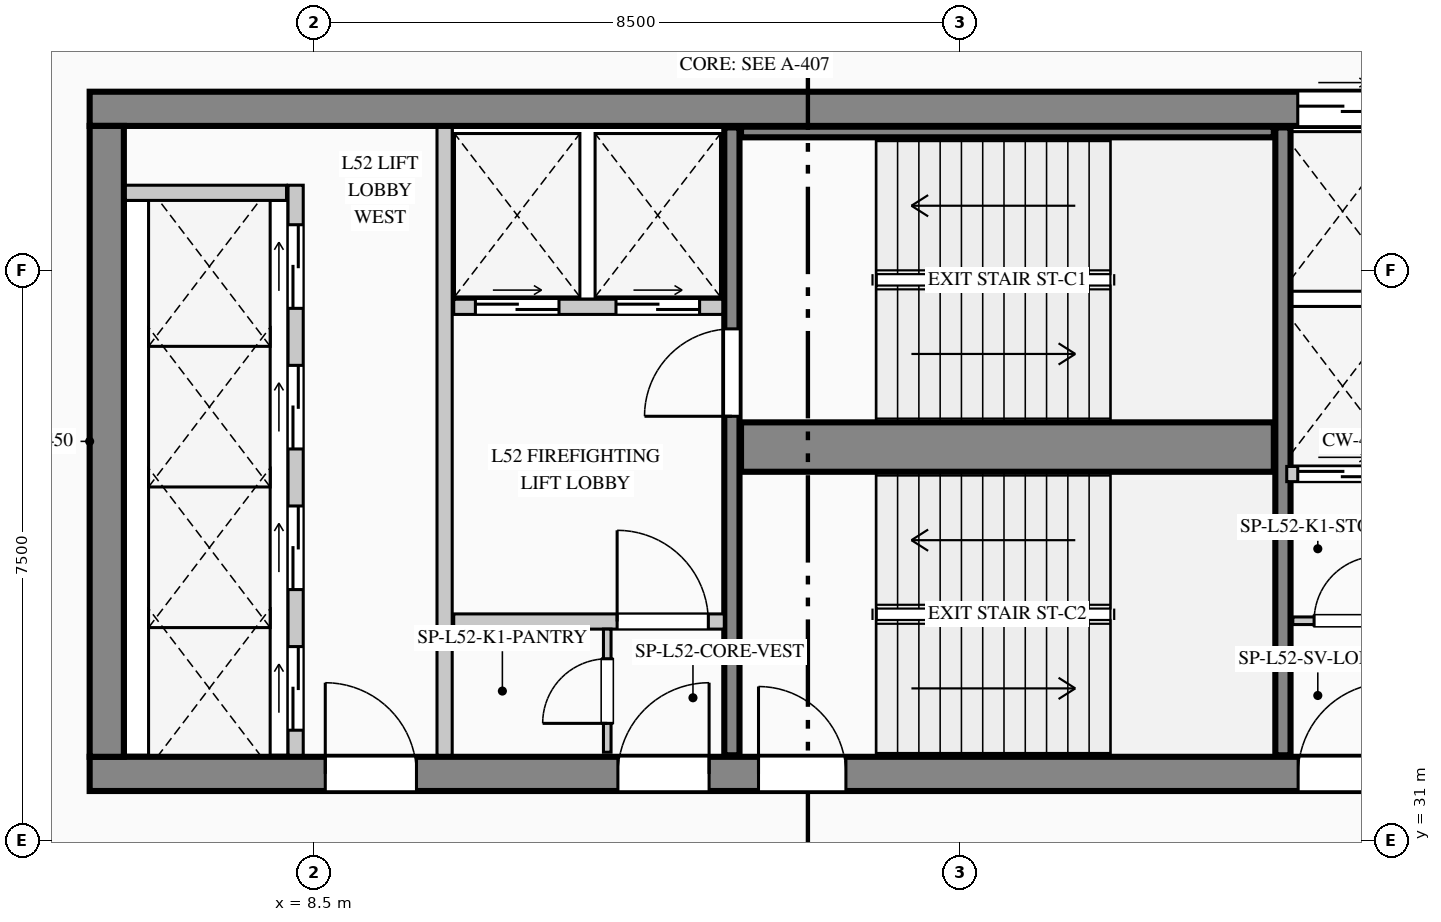
"""IFC4 building model, lengths in metres.
Left out: names, types, materials, properties, quantities, classifications, styles, units other than length and angle.
Written with IfcOpenShell. Run it as: python <this file> out.ifc"""

import sys

from ifc_helpers import new_model, si_unit, direction, frame, frame_2d, origin, place, context, subcontext, project, spatial, rectangle, extrude, element, fill, save


model = new_model("IFC4")
c1 = context("Model", 3, precision=1e-05, world=origin(), true_north=direction((0.0, 1.0)))
c2 = subcontext(c1, "Body", "Model", "MODEL_VIEW")
j1 = project(units=[si_unit("LENGTHUNIT", "METRE"), si_unit("PLANEANGLEUNIT", "RADIAN")], contexts=[c1])
p1 = place(None, origin())
s1 = spatial("IfcSite", under=j1, at=p1, CompositionType="ELEMENT")
p2 = place(p1, origin())
s2 = spatial("IfcBuilding", under=s1, at=p2, CompositionType="ELEMENT")
p3 = place(p2, frame((0.0, 0.0, 219.3)))
s3 = spatial("IfcBuildingStorey", under=s2, at=p3, CompositionType="ELEMENT", Elevation=219.3)
p4 = place(p3, frame((5.55, 40.625, 0.0), z_axis=(0.0, 0.0, 1.0), x_axis=(1.0, 0.0, 0.0)))
e1 = element("IfcWall", 1, at=p4, inside=s3, PredefinedType="SHEAR", context=c2, shape_type="SweptSolid", body=[
    extrude(rectangle(XDim=17.75, YDim=0.45, at=frame_2d((8.875, 0.0))), origin(), (0.0, 0.0, 1.0), 3.95),
])
p5 = place(p4, frame((15.895, 0.0, 0.0)))
e2 = element("IfcOpeningElement", 2, at=p5, cuts=e1, PredefinedType="OPENING", context=c2, shape_type="SweptSolid", body=[
    extrude(rectangle(XDim=1.18, YDim=2.25, at=frame_2d((0.59, 1.125))), frame((0.0, 0.235, 0.0), z_axis=(0.0, -1.0, 0.0), x_axis=(1.0, 0.0, 0.0)), (0.0, 0.0, 1.0), 0.47),
])
p6 = place(p3, frame((5.55, 31.875, 0.0), z_axis=(0.0, 0.0, 1.0), x_axis=(1.0, 0.0, 0.0)))
e3 = element("IfcWall", 3, at=p6, inside=s3, PredefinedType="SHEAR", context=c2, shape_type="SweptSolid", body=[
    extrude(rectangle(XDim=17.75, YDim=0.45, at=frame_2d((8.875, 0.0))), origin(), (0.0, 0.0, 1.0), 3.95),
])
p7 = place(p6, frame((3.1, 0.0, 0.0)))
e4 = element("IfcOpeningElement", 4, at=p7, cuts=e3, PredefinedType="OPENING", context=c2, shape_type="SweptSolid", body=[
    extrude(rectangle(XDim=1.2, YDim=2.2, at=frame_2d((0.6, 1.1))), frame((0.0, 0.235, 0.0), z_axis=(0.0, -1.0, 0.0), x_axis=(1.0, 0.0, 0.0)), (0.0, 0.0, 1.0), 0.47),
])
p8 = place(p6, frame((6.95, 0.0, 0.0)))
e5 = element("IfcOpeningElement", 5, at=p8, cuts=e3, PredefinedType="OPENING", context=c2, shape_type="SweptSolid", body=[
    extrude(rectangle(XDim=1.2, YDim=2.2, at=frame_2d((0.6, 1.1))), frame((0.0, 0.235, 0.0), z_axis=(0.0, -1.0, 0.0), x_axis=(1.0, 0.0, 0.0)), (0.0, 0.0, 1.0), 0.47),
])
p9 = place(p6, frame((8.8, 0.0, 0.0)))
e6 = element("IfcOpeningElement", 6, at=p9, cuts=e3, PredefinedType="OPENING", context=c2, shape_type="SweptSolid", body=[
    extrude(rectangle(XDim=1.15, YDim=2.2, at=frame_2d((0.575, 1.1))), frame((0.0, 0.235, 0.0), z_axis=(0.0, -1.0, 0.0), x_axis=(1.0, 0.0, 0.0)), (0.0, 0.0, 1.0), 0.47),
])
p10 = place(p6, frame((15.9, 0.0, 0.0)))
e7 = element("IfcOpeningElement", 7, at=p10, cuts=e3, PredefinedType="OPENING", context=c2, shape_type="SweptSolid", body=[
    extrude(rectangle(XDim=1.2, YDim=2.2, at=frame_2d((0.6, 1.1))), frame((0.0, 0.235, 0.0), z_axis=(0.0, -1.0, 0.0), x_axis=(1.0, 0.0, 0.0)), (0.0, 0.0, 1.0), 0.47),
])
p11 = place(p3, frame((5.775, 32.1, 0.0), z_axis=(0.0, 0.0, 1.0), x_axis=(0.0, 1.0, 0.0)))
e8 = element("IfcWall", 8, at=p11, inside=s3, PredefinedType="SHEAR", context=c2, shape_type="SweptSolid", body=[
    extrude(rectangle(XDim=8.3, YDim=0.45, at=frame_2d((4.15, 0.0))), origin(), (0.0, 0.0, 1.0), 3.95),
])
p12 = place(p3, frame((14.0, 32.12, 0.0), z_axis=(0.0, 0.0, 1.0), x_axis=(0.0, 1.0, 0.0)))
e9 = element("IfcWall", 9, at=p12, inside=s3, PredefinedType="SHEAR", context=c2, shape_type="SweptSolid", body=[
    extrude(rectangle(XDim=8.26, YDim=0.2, at=frame_2d((4.13, 0.0))), origin(), (0.0, 0.0, 1.0), 3.95),
])
p13 = place(p12, frame((4.46, 0.0, 0.0)))
e10 = element("IfcOpeningElement", 10, at=p13, cuts=e9, PredefinedType="OPENING", context=c2, shape_type="SweptSolid", body=[
    extrude(rectangle(XDim=1.15, YDim=2.2, at=frame_2d((0.575, 1.1))), frame((0.0, 0.11, 0.0), z_axis=(0.0, -1.0, 0.0), x_axis=(1.0, 0.0, 0.0)), (0.0, 0.0, 1.0), 0.22),
])
p14 = place(p3, frame((14.12, 36.175, 0.0), z_axis=(0.0, 0.0, 1.0), x_axis=(1.0, 0.0, 0.0)))
e11 = element("IfcWall", 11, at=p14, inside=s3, PredefinedType="SHEAR", context=c2, shape_type="SweptSolid", body=[
    extrude(rectangle(XDim=7.01, YDim=0.65, at=frame_2d((3.505, 0.0))), origin(), (0.0, 0.0, 1.0), 3.95),
])
p15 = place(p3, frame((21.25, 32.12, 0.0), z_axis=(0.0, 0.0, 1.0), x_axis=(0.0, 1.0, 0.0)))
e12 = element("IfcWall", 12, at=p15, inside=s3, PredefinedType="SHEAR", context=c2, shape_type="SweptSolid", body=[
    extrude(rectangle(XDim=8.26, YDim=0.2, at=frame_2d((4.13, 0.0))), origin(), (0.0, 0.0, 1.0), 3.95),
])
p16 = place(p3, frame((14.12, 40.32, 0.0), z_axis=(0.0, 0.0, 1.0), x_axis=(1.0, 0.0, 0.0)))
e13 = element("IfcWall", 13, at=p16, inside=s3, PredefinedType="SHEAR", context=c2, shape_type="SweptSolid", body=[
    extrude(rectangle(XDim=7.01, YDim=0.14, at=frame_2d((3.505, 0.0))), origin(), (0.0, 0.0, 1.0), 3.95),
])
p17 = place(p3, frame((7.46, 4.62, 0.0), z_axis=(0.0, 0.0, 1.0), x_axis=(-0.123515576323, 0.992342633573, 0.0)))
e14 = element("IfcWall", 14, at=p17, inside=s3, PredefinedType="STANDARD", context=c2, shape_type="SweptSolid", body=[
    extrude(rectangle(XDim=37.043, YDim=0.24, at=frame_2d((18.522, 0.0))), origin(), (0.0, 0.0, 1.0), 3.7),
])
p18 = place(p17, frame((9.536, 0.0, 0.9)))
e15 = element("IfcOpeningElement", 15, at=p18, cuts=e14, PredefinedType="OPENING", context=c2, shape_type="SweptSolid", body=[
    extrude(rectangle(XDim=2.7, YDim=2.1, at=frame_2d((1.35, 1.05))), frame((0.0, 0.13, 0.0), z_axis=(0.0, -1.0, 0.0), x_axis=(1.0, 0.0, 0.0)), (0.0, 0.0, 1.0), 0.26),
])
p19 = place(p3, frame((8.26, 32.12, 0.0), z_axis=(0.0, 0.0, 1.0), x_axis=(0.0, 1.0, 0.0)))
e16 = element("IfcWall", 16, at=p19, inside=s3, PredefinedType="PARTITIONING", context=c2, shape_type="SweptSolid", body=[
    extrude(rectangle(XDim=7.5, YDim=0.2, at=frame_2d((3.75, 0.0))), origin(), (0.0, 0.0, 1.0), 3.7),
])
p20 = place(p19, frame((0.33, 0.0, 0.0)))
e17 = element("IfcOpeningElement", 17, at=p20, cuts=e16, PredefinedType="OPENING", context=c2, shape_type="SweptSolid", body=[
    extrude(rectangle(XDim=1.1, YDim=2.2, at=frame_2d((0.55, 1.1))), frame((0.0, 0.11, 0.0), z_axis=(0.0, -1.0, 0.0), x_axis=(1.0, 0.0, 0.0)), (0.0, 0.0, 1.0), 0.22),
])
p21 = place(p19, frame((2.18, 0.0, 0.0)))
e18 = element("IfcOpeningElement", 18, at=p21, cuts=e16, PredefinedType="OPENING", context=c2, shape_type="SweptSolid", body=[
    extrude(rectangle(XDim=1.1, YDim=2.2, at=frame_2d((0.55, 1.1))), frame((0.0, 0.11, 0.0), z_axis=(0.0, -1.0, 0.0), x_axis=(1.0, 0.0, 0.0)), (0.0, 0.0, 1.0), 0.22),
])
p22 = place(p19, frame((4.03, 0.0, 0.0)))
e19 = element("IfcOpeningElement", 19, at=p22, cuts=e16, PredefinedType="OPENING", context=c2, shape_type="SweptSolid", body=[
    extrude(rectangle(XDim=1.1, YDim=2.2, at=frame_2d((0.55, 1.1))), frame((0.0, 0.11, 0.0), z_axis=(0.0, -1.0, 0.0), x_axis=(1.0, 0.0, 0.0)), (0.0, 0.0, 1.0), 0.22),
])
p23 = place(p19, frame((5.88, 0.0, 0.0)))
e20 = element("IfcOpeningElement", 20, at=p23, cuts=e16, PredefinedType="OPENING", context=c2, shape_type="SweptSolid", body=[
    extrude(rectangle(XDim=1.1, YDim=2.2, at=frame_2d((0.55, 1.1))), frame((0.0, 0.11, 0.0), z_axis=(0.0, -1.0, 0.0), x_axis=(1.0, 0.0, 0.0)), (0.0, 0.0, 1.0), 0.22),
])
p24 = place(p3, frame((6.02, 39.52, 0.0), z_axis=(0.0, 0.0, 1.0), x_axis=(1.0, 0.0, 0.0)))
e21 = element("IfcWall", 21, at=p24, inside=s3, PredefinedType="PARTITIONING", context=c2, shape_type="SweptSolid", body=[
    extrude(rectangle(XDim=2.12, YDim=0.2, at=frame_2d((1.06, 0.0))), origin(), (0.0, 0.0, 1.0), 3.7),
])
p25 = place(p3, frame((10.22, 32.12, 0.0), z_axis=(0.0, 0.0, 1.0), x_axis=(0.0, 1.0, 0.0)))
e22 = element("IfcWall", 22, at=p25, inside=s3, PredefinedType="PARTITIONING", context=c2, shape_type="SweptSolid", body=[
    extrude(rectangle(XDim=8.26, YDim=0.2, at=frame_2d((4.13, 0.0))), origin(), (0.0, 0.0, 1.0), 3.7),
])
p26 = place(p3, frame((10.34, 38.02, 0.0), z_axis=(0.0, 0.0, 1.0), x_axis=(1.0, 0.0, 0.0)))
e23 = element("IfcWall", 23, at=p26, inside=s3, PredefinedType="PARTITIONING", context=c2, shape_type="SweptSolid", body=[
    extrude(rectangle(XDim=3.54, YDim=0.2, at=frame_2d((1.77, 0.0))), origin(), (0.0, 0.0, 1.0), 3.7),
])
p27 = place(p26, frame((0.285, 0.0, 0.0)))
e24 = element("IfcOpeningElement", 24, at=p27, cuts=e23, PredefinedType="OPENING", context=c2, shape_type="SweptSolid", body=[
    extrude(rectangle(XDim=1.1, YDim=2.2, at=frame_2d((0.55, 1.1))), frame((0.0, 0.11, 0.0), z_axis=(0.0, -1.0, 0.0), x_axis=(1.0, 0.0, 0.0)), (0.0, 0.0, 1.0), 0.22),
])
p28 = place(p26, frame((2.135, 0.0, 0.0)))
e25 = element("IfcOpeningElement", 25, at=p28, cuts=e23, PredefinedType="OPENING", context=c2, shape_type="SweptSolid", body=[
    extrude(rectangle(XDim=1.1, YDim=2.2, at=frame_2d((0.55, 1.1))), frame((0.0, 0.11, 0.0), z_axis=(0.0, -1.0, 0.0), x_axis=(1.0, 0.0, 0.0)), (0.0, 0.0, 1.0), 0.22),
])
p29 = place(p3, frame((10.34, 33.88, 0.0), z_axis=(0.0, 0.0, 1.0), x_axis=(1.0, 0.0, 0.0)))
e26 = element("IfcWall", 26, at=p29, inside=s3, PredefinedType="PARTITIONING", context=c2, shape_type="SweptSolid", body=[
    extrude(rectangle(XDim=3.56, YDim=0.2, at=frame_2d((1.78, 0.0))), origin(), (0.0, 0.0, 1.0), 3.7),
])
p30 = place(p29, frame((2.15, 0.0, 0.0)))
e27 = element("IfcOpeningElement", 27, at=p30, cuts=e26, PredefinedType="OPENING", context=c2, shape_type="SweptSolid", body=[
    extrude(rectangle(XDim=1.2, YDim=2.2, at=frame_2d((0.6, 1.1))), frame((0.0, 0.11, 0.0), z_axis=(0.0, -1.0, 0.0), x_axis=(1.0, 0.0, 0.0)), (0.0, 0.0, 1.0), 0.22),
])
p31 = place(p3, frame((12.36, 32.16, 0.0), z_axis=(0.0, 0.0, 1.0), x_axis=(0.0, 1.0, 0.0)))
e28 = element("IfcWall", 28, at=p31, inside=s3, PredefinedType="PARTITIONING", context=c2, shape_type="SweptSolid", body=[
    extrude(rectangle(XDim=1.62, YDim=0.1, at=frame_2d((0.81, 0.0))), origin(), (0.0, 0.0, 1.0), 3.7),
])
p32 = place(p31, frame((0.38, 0.0, 0.0)))
e29 = element("IfcOpeningElement", 29, at=p32, cuts=e28, PredefinedType="OPENING", context=c2, shape_type="SweptSolid", body=[
    extrude(rectangle(XDim=0.85, YDim=2.1, at=frame_2d((0.425, 1.05))), frame((0.0, 0.06, 0.0), z_axis=(0.0, -1.0, 0.0), x_axis=(1.0, 0.0, 0.0)), (0.0, 0.0, 1.0), 0.12),
])
p33 = place(p3, frame((21.38, 33.89, 0.0), z_axis=(0.0, 0.0, 1.0), x_axis=(1.0, 0.0, 0.0)))
e30 = element("IfcWall", 30, at=p33, inside=s3, PredefinedType="PARTITIONING", context=c2, shape_type="SweptSolid", body=[
    extrude(rectangle(XDim=1.42, YDim=0.1, at=frame_2d((0.71, 0.0))), origin(), (0.0, 0.0, 1.0), 3.7),
])
p34 = place(p33, frame((0.28, 0.0, 0.0)))
e31 = element("IfcOpeningElement", 31, at=p34, cuts=e30, PredefinedType="OPENING", context=c2, shape_type="SweptSolid", body=[
    extrude(rectangle(XDim=0.85, YDim=2.1, at=frame_2d((0.425, 1.05))), frame((0.0, 0.06, 0.0), z_axis=(0.0, -1.0, 0.0), x_axis=(1.0, 0.0, 0.0)), (0.0, 0.0, 1.0), 0.12),
])
p35 = place(p3, frame((21.3, 35.82, 0.0), z_axis=(0.0, 0.0, 1.0), x_axis=(1.0, 0.0, 0.0)))
e32 = element("IfcWall", 32, at=p35, inside=s3, PredefinedType="PARTITIONING", context=c2, shape_type="SweptSolid", body=[
    extrude(rectangle(XDim=1.5, YDim=0.2, at=frame_2d((0.75, 0.0))), origin(), (0.0, 0.0, 1.0), 3.7),
])
p36 = place(p35, frame((0.145, 0.0, 0.0)))
e33 = element("IfcOpeningElement", 33, at=p36, cuts=e32, PredefinedType="OPENING", context=c2, shape_type="SweptSolid", body=[
    extrude(rectangle(XDim=1.18, YDim=2.25, at=frame_2d((0.59, 1.125))), frame((0.0, 0.11, 0.0), z_axis=(0.0, -1.0, 0.0), x_axis=(1.0, 0.0, 0.0)), (0.0, 0.0, 1.0), 0.22),
])
p37 = place(p7, origin())
e34 = element("IfcDoor", 34, at=p37, inside=s3, OperationType="SINGLE_SWING_LEFT", PredefinedType="DOOR", context=c2, shape_type="SweptSolid", body=[
    extrude(rectangle(XDim=1.2, YDim=2.2, at=frame_2d((0.6, 1.1))), frame((0.0, 0.025, 0.0), z_axis=(0.0, -1.0, 0.0), x_axis=(1.0, 0.0, 0.0)), (0.0, 0.0, 1.0), 0.05),
])
fill(e4, e34)
p38 = place(p8, origin())
e35 = element("IfcDoor", 35, at=p38, inside=s3, OperationType="SINGLE_SWING_RIGHT", PredefinedType="DOOR", context=c2, shape_type="SweptSolid", body=[
    extrude(rectangle(XDim=1.2, YDim=2.2, at=frame_2d((0.6, 1.1))), frame((0.0, 0.025, 0.0), z_axis=(0.0, -1.0, 0.0), x_axis=(1.0, 0.0, 0.0)), (0.0, 0.0, 1.0), 0.05),
])
fill(e5, e35)
p39 = place(p9, origin())
e36 = element("IfcDoor", 36, at=p39, inside=s3, OperationType="SINGLE_SWING_LEFT", PredefinedType="DOOR", context=c2, shape_type="SweptSolid", body=[
    extrude(rectangle(XDim=1.15, YDim=2.2, at=frame_2d((0.575, 1.1))), frame((0.0, 0.025, 0.0), z_axis=(0.0, -1.0, 0.0), x_axis=(1.0, 0.0, 0.0)), (0.0, 0.0, 1.0), 0.05),
])
fill(e6, e36)
p40 = place(p10, origin())
e37 = element("IfcDoor", 37, at=p40, inside=s3, OperationType="SINGLE_SWING_RIGHT", PredefinedType="DOOR", context=c2, shape_type="SweptSolid", body=[
    extrude(rectangle(XDim=1.2, YDim=2.2, at=frame_2d((0.6, 1.1))), frame((0.0, 0.025, 0.0), z_axis=(0.0, -1.0, 0.0), x_axis=(1.0, 0.0, 0.0)), (0.0, 0.0, 1.0), 0.05),
])
fill(e7, e37)
p41 = place(p30, origin())
e38 = element("IfcDoor", 38, at=p41, inside=s3, OperationType="SINGLE_SWING_LEFT", PredefinedType="DOOR", context=c2, shape_type="SweptSolid", body=[
    extrude(rectangle(XDim=1.2, YDim=2.2, at=frame_2d((0.6, 1.1))), frame((0.0, 0.025, 0.0), z_axis=(0.0, -1.0, 0.0), x_axis=(1.0, 0.0, 0.0)), (0.0, 0.0, 1.0), 0.05),
])
fill(e27, e38)
p42 = place(p32, origin())
e39 = element("IfcDoor", 39, at=p42, inside=s3, OperationType="SINGLE_SWING_LEFT", PredefinedType="DOOR", context=c2, shape_type="SweptSolid", body=[
    extrude(rectangle(XDim=0.85, YDim=2.1, at=frame_2d((0.425, 1.05))), frame((0.0, 0.025, 0.0), z_axis=(0.0, -1.0, 0.0), x_axis=(1.0, 0.0, 0.0)), (0.0, 0.0, 1.0), 0.05),
])
fill(e29, e39)
p43 = place(p34, origin())
e40 = element("IfcDoor", 40, at=p43, inside=s3, OperationType="SINGLE_SWING_RIGHT", PredefinedType="DOOR", context=c2, shape_type="SweptSolid", body=[
    extrude(rectangle(XDim=0.85, YDim=2.1, at=frame_2d((0.425, 1.05))), frame((0.0, 0.025, 0.0), z_axis=(0.0, -1.0, 0.0), x_axis=(1.0, 0.0, 0.0)), (0.0, 0.0, 1.0), 0.05),
])
fill(e31, e40)
p44 = place(p13, origin())
e41 = element("IfcDoor", 41, at=p44, inside=s3, OperationType="SINGLE_SWING_LEFT", PredefinedType="DOOR", context=c2, shape_type="SweptSolid", body=[
    extrude(rectangle(XDim=1.15, YDim=2.2, at=frame_2d((0.575, 1.1))), frame((0.0, 0.025, 0.0), z_axis=(0.0, -1.0, 0.0), x_axis=(1.0, 0.0, 0.0)), (0.0, 0.0, 1.0), 0.05),
])
fill(e10, e41)
p45 = place(p20, origin())
e42 = element("IfcDoor", 42, at=p45, inside=s3, OperationType="DOUBLE_DOOR_SLIDING", PredefinedType="DOOR", context=c2, shape_type="SweptSolid", body=[
    extrude(rectangle(XDim=1.1, YDim=2.2, at=frame_2d((0.55, 1.1))), frame((0.0, 0.025, 0.0), z_axis=(0.0, -1.0, 0.0), x_axis=(1.0, 0.0, 0.0)), (0.0, 0.0, 1.0), 0.05),
])
fill(e17, e42)
p46 = place(p21, origin())
e43 = element("IfcDoor", 43, at=p46, inside=s3, OperationType="DOUBLE_DOOR_SLIDING", PredefinedType="DOOR", context=c2, shape_type="SweptSolid", body=[
    extrude(rectangle(XDim=1.1, YDim=2.2, at=frame_2d((0.55, 1.1))), frame((0.0, 0.025, 0.0), z_axis=(0.0, -1.0, 0.0), x_axis=(1.0, 0.0, 0.0)), (0.0, 0.0, 1.0), 0.05),
])
fill(e18, e43)
p47 = place(p22, origin())
e44 = element("IfcDoor", 44, at=p47, inside=s3, OperationType="DOUBLE_DOOR_SLIDING", PredefinedType="DOOR", context=c2, shape_type="SweptSolid", body=[
    extrude(rectangle(XDim=1.1, YDim=2.2, at=frame_2d((0.55, 1.1))), frame((0.0, 0.025, 0.0), z_axis=(0.0, -1.0, 0.0), x_axis=(1.0, 0.0, 0.0)), (0.0, 0.0, 1.0), 0.05),
])
fill(e19, e44)
p48 = place(p23, origin())
e45 = element("IfcDoor", 45, at=p48, inside=s3, OperationType="DOUBLE_DOOR_SLIDING", PredefinedType="DOOR", context=c2, shape_type="SweptSolid", body=[
    extrude(rectangle(XDim=1.1, YDim=2.2, at=frame_2d((0.55, 1.1))), frame((0.0, 0.025, 0.0), z_axis=(0.0, -1.0, 0.0), x_axis=(1.0, 0.0, 0.0)), (0.0, 0.0, 1.0), 0.05),
])
fill(e20, e45)
p49 = place(p27, origin())
e46 = element("IfcDoor", 46, at=p49, inside=s3, OperationType="DOUBLE_DOOR_SLIDING", PredefinedType="DOOR", context=c2, shape_type="SweptSolid", body=[
    extrude(rectangle(XDim=1.1, YDim=2.2, at=frame_2d((0.55, 1.1))), frame((0.0, 0.025, 0.0), z_axis=(0.0, -1.0, 0.0), x_axis=(1.0, 0.0, 0.0)), (0.0, 0.0, 1.0), 0.05),
])
fill(e24, e46)
p50 = place(p28, origin())
e47 = element("IfcDoor", 47, at=p50, inside=s3, OperationType="DOUBLE_DOOR_SLIDING", PredefinedType="DOOR", context=c2, shape_type="SweptSolid", body=[
    extrude(rectangle(XDim=1.1, YDim=2.2, at=frame_2d((0.55, 1.1))), frame((0.0, 0.025, 0.0), z_axis=(0.0, -1.0, 0.0), x_axis=(1.0, 0.0, 0.0)), (0.0, 0.0, 1.0), 0.05),
])
fill(e25, e47)
p51 = place(p5, origin())
e48 = element("IfcDoor", 48, at=p51, inside=s3, OperationType="DOUBLE_DOOR_SLIDING", PredefinedType="DOOR", context=c2, shape_type="SweptSolid", body=[
    extrude(rectangle(XDim=1.18, YDim=2.25, at=frame_2d((0.59, 1.125))), frame((0.0, 0.025, 0.0), z_axis=(0.0, -1.0, 0.0), x_axis=(1.0, 0.0, 0.0)), (0.0, 0.0, 1.0), 0.05),
])
fill(e2, e48)
p52 = place(p36, origin())
e49 = element("IfcDoor", 49, at=p52, inside=s3, OperationType="DOUBLE_DOOR_SLIDING", PredefinedType="DOOR", context=c2, shape_type="SweptSolid", body=[
    extrude(rectangle(XDim=1.18, YDim=2.25, at=frame_2d((0.59, 1.125))), frame((0.0, 0.025, 0.0), z_axis=(0.0, -1.0, 0.0), x_axis=(1.0, 0.0, 0.0)), (0.0, 0.0, 1.0), 0.05),
])
fill(e33, e49)
save(model, sys.argv[1])
